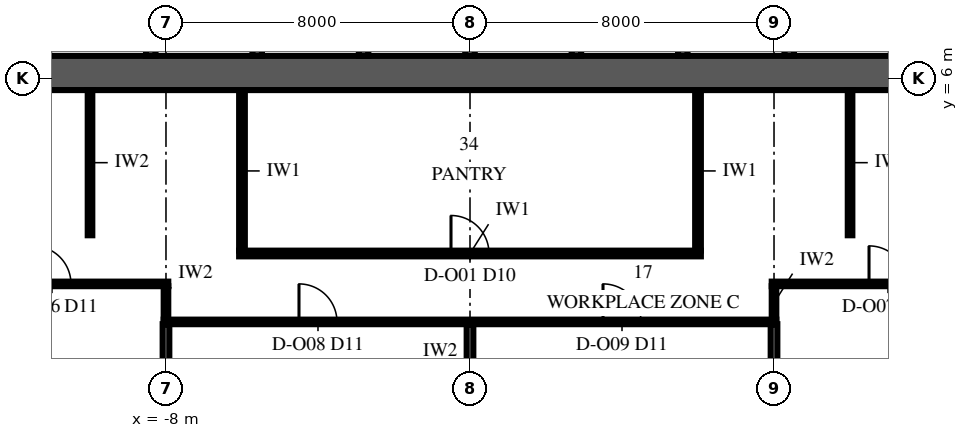
"""IFC4 building model, lengths in metres.
Left out: names, types, materials, properties, quantities, classifications, styles, units other than length and angle.
Written with IfcOpenShell. Run it as: python <this file> out.ifc"""

import sys

from ifc_helpers import new_model, si_unit, direction, frame, frame_2d, origin, place, context, subcontext, project, spatial, rectangle, extrude, element, fill, save


model = new_model("IFC4")
c1 = context("Model", 3, precision=1e-05, world=origin(), true_north=direction((0.0, 1.0)))
c2 = subcontext(c1, "Body", "Model", "MODEL_VIEW")
j1 = project(units=[si_unit("LENGTHUNIT", "METRE"), si_unit("PLANEANGLEUNIT", "RADIAN")], contexts=[c1])
p1 = place(None, origin())
s1 = spatial("IfcSite", under=j1, at=p1, CompositionType="ELEMENT")
p2 = place(p1, origin())
s2 = spatial("IfcBuilding", under=s1, at=p2, CompositionType="ELEMENT")
p3 = place(p2, frame((0.0, 0.0, 72.0)))
s3 = spatial("IfcBuildingStorey", under=s2, at=p3, CompositionType="ELEMENT", Elevation=72.0)
p4 = place(p3, frame((-13.85, 6.15, 0.0), z_axis=(0.0, 0.0, 1.0), x_axis=(1.0, 0.0, 0.0)))
e1 = element("IfcWall", 1, at=p4, inside=s3, PredefinedType="SHEAR", context=c2, shape_type="SweptSolid", body=[
    extrude(rectangle(XDim=27.7, YDim=0.9, at=frame_2d((13.85, 0.0))), origin(), (0.0, 0.0, 1.0), 4.0),
])
for number, where, z_axis, x_axis in (
    (2, (-8.4, 6.6, 0.0), (0.0, 0.0, 1.0), (0.0, 1.0, 0.0)),
    (3, (-5.6, 6.6, 0.0), (0.0, 0.0, 1.0), (0.0, 1.0, 0.0)),
    (4, (-2.8, 6.6, 0.0), (0.0, 0.0, 1.0), (0.0, 1.0, 0.0)),
    (5, (0.0, 6.6, 0.0), (0.0, 0.0, 1.0), (0.0, 1.0, 0.0)),
    (6, (2.8, 6.6, 0.0), (0.0, 0.0, 1.0), (0.0, 1.0, 0.0)),
    (7, (5.6, 6.6, 0.0), (0.0, 0.0, 1.0), (0.0, 1.0, 0.0)),
    (8, (8.4, 6.6, 0.0), (0.0, 0.0, 1.0), (0.0, 1.0, 0.0)),
):
    element("IfcWall", number, at=place(p3, frame(where, z_axis=z_axis, x_axis=x_axis)), inside=s3, PredefinedType="SHEAR", context=c2, shape_type="SweptSolid", body=[
        extrude(rectangle(XDim=2.675, YDim=0.25, at=frame_2d((1.337, 0.0))), origin(), (0.0, 0.0, 1.0), 4.0),
    ])
p5 = place(p3, frame((-8.06, -0.4, 0.0), z_axis=(0.0, 0.0, 1.0), x_axis=(1.0, 0.0, 0.0)))
e9 = element("IfcWall", 9, at=p5, inside=s3, PredefinedType="PARTITIONING", context=c2, shape_type="SweptSolid", body=[
    extrude(rectangle(XDim=16.12, YDim=0.12, at=frame_2d((8.06, 0.0))), origin(), (0.0, 0.0, 1.0), 3.25),
])
p6 = place(p5, frame((3.56, 0.0, 0.0)))
e10 = element("IfcOpeningElement", 10, at=p6, cuts=e9, PredefinedType="OPENING", context=c2, shape_type="SweptSolid", body=[
    extrude(rectangle(XDim=1.0, YDim=2.4, at=frame_2d((0.5, 1.2))), frame((0.0, 0.075, 0.0), z_axis=(0.0, -1.0, 0.0), x_axis=(1.0, 0.0, 0.0)), (0.0, 0.0, 1.0), 0.15),
])
p7 = place(p5, frame((11.56, 0.0, 0.0)))
e11 = element("IfcOpeningElement", 11, at=p7, cuts=e9, PredefinedType="OPENING", context=c2, shape_type="SweptSolid", body=[
    extrude(rectangle(XDim=1.0, YDim=2.4, at=frame_2d((0.5, 1.2))), frame((0.0, 0.075, 0.0), z_axis=(0.0, -1.0, 0.0), x_axis=(1.0, 0.0, 0.0)), (0.0, 0.0, 1.0), 0.15),
])
p8 = place(p3, frame((-22.06, 0.6, 0.0), z_axis=(0.0, 0.0, 1.0), x_axis=(1.0, 0.0, 0.0)))
e12 = element("IfcWall", 12, at=p8, inside=s3, PredefinedType="PARTITIONING", context=c2, shape_type="SweptSolid", body=[
    extrude(rectangle(XDim=14.12, YDim=0.12, at=frame_2d((7.06, 0.0))), origin(), (0.0, 0.0, 1.0), 3.25),
])
p9 = place(p8, frame((1.56, 0.0, 0.0)))
e13 = element("IfcOpeningElement", 13, at=p9, cuts=e12, PredefinedType="OPENING", context=c2, shape_type="SweptSolid", body=[
    extrude(rectangle(XDim=1.0, YDim=2.4, at=frame_2d((0.5, 1.2))), frame((0.0, 0.075, 0.0), z_axis=(0.0, -1.0, 0.0), x_axis=(1.0, 0.0, 0.0)), (0.0, 0.0, 1.0), 0.15),
])
p10 = place(p8, frame((5.56, 0.0, 0.0)))
e14 = element("IfcOpeningElement", 14, at=p10, cuts=e12, PredefinedType="OPENING", context=c2, shape_type="SweptSolid", body=[
    extrude(rectangle(XDim=1.0, YDim=2.4, at=frame_2d((0.5, 1.2))), frame((0.0, 0.075, 0.0), z_axis=(0.0, -1.0, 0.0), x_axis=(1.0, 0.0, 0.0)), (0.0, 0.0, 1.0), 0.15),
])
p11 = place(p8, frame((10.56, 0.0, 0.0)))
e15 = element("IfcOpeningElement", 15, at=p11, cuts=e12, PredefinedType="OPENING", context=c2, shape_type="SweptSolid", body=[
    extrude(rectangle(XDim=1.0, YDim=2.4, at=frame_2d((0.5, 1.2))), frame((0.0, 0.075, 0.0), z_axis=(0.0, -1.0, 0.0), x_axis=(1.0, 0.0, 0.0)), (0.0, 0.0, 1.0), 0.15),
])
p12 = place(p3, frame((7.94, 0.6, 0.0), z_axis=(0.0, 0.0, 1.0), x_axis=(1.0, 0.0, 0.0)))
e16 = element("IfcWall", 16, at=p12, inside=s3, PredefinedType="PARTITIONING", context=c2, shape_type="SweptSolid", body=[
    extrude(rectangle(XDim=14.12, YDim=0.12, at=frame_2d((7.06, 0.0))), origin(), (0.0, 0.0, 1.0), 3.25),
])
p13 = place(p12, frame((7.56, 0.0, 0.0)))
e17 = element("IfcOpeningElement", 17, at=p13, cuts=e16, PredefinedType="OPENING", context=c2, shape_type="SweptSolid", body=[
    extrude(rectangle(XDim=1.0, YDim=2.4, at=frame_2d((0.5, 1.2))), frame((0.0, 0.075, 0.0), z_axis=(0.0, -1.0, 0.0), x_axis=(1.0, 0.0, 0.0)), (0.0, 0.0, 1.0), 0.15),
])
p14 = place(p12, frame((11.56, 0.0, 0.0)))
e18 = element("IfcOpeningElement", 18, at=p14, cuts=e16, PredefinedType="OPENING", context=c2, shape_type="SweptSolid", body=[
    extrude(rectangle(XDim=1.0, YDim=2.4, at=frame_2d((0.5, 1.2))), frame((0.0, 0.075, 0.0), z_axis=(0.0, -1.0, 0.0), x_axis=(1.0, 0.0, 0.0)), (0.0, 0.0, 1.0), 0.15),
])
p15 = place(p12, frame((2.56, 0.0, 0.0)))
e19 = element("IfcOpeningElement", 19, at=p15, cuts=e16, PredefinedType="OPENING", context=c2, shape_type="SweptSolid", body=[
    extrude(rectangle(XDim=1.0, YDim=2.4, at=frame_2d((0.5, 1.2))), frame((0.0, 0.075, 0.0), z_axis=(0.0, -1.0, 0.0), x_axis=(1.0, 0.0, 0.0)), (0.0, 0.0, 1.0), 0.15),
])
p16 = place(p3, frame((-6.075, 1.4, 0.0), z_axis=(0.0, 0.0, 1.0), x_axis=(1.0, 0.0, 0.0)))
e20 = element("IfcWall", 20, at=p16, inside=s3, PredefinedType="PARTITIONING", context=c2, shape_type="SweptSolid", body=[
    extrude(rectangle(XDim=12.15, YDim=0.15, at=frame_2d((6.075, 0.0))), origin(), (0.0, 0.0, 1.0), 3.25),
])
p17 = place(p16, frame((5.575, 0.0, 0.0)))
e21 = element("IfcOpeningElement", 21, at=p17, cuts=e20, PredefinedType="OPENING", context=c2, shape_type="SweptSolid", body=[
    extrude(rectangle(XDim=1.0, YDim=2.3, at=frame_2d((0.5, 1.15))), frame((0.0, 0.09, 0.0), z_axis=(0.0, -1.0, 0.0), x_axis=(1.0, 0.0, 0.0)), (0.0, 0.0, 1.0), 0.18),
])
p18 = place(p3, frame((-8.0, -4.74, 0.0), z_axis=(0.0, 0.0, 1.0), x_axis=(0.0, 1.0, 0.0)))
e22 = element("IfcWall", 22, at=p18, inside=s3, PredefinedType="PARTITIONING", context=c2, shape_type="SweptSolid", body=[
    extrude(rectangle(XDim=4.28, YDim=0.175, at=frame_2d((2.14, 0.0))), origin(), (0.0, 0.0, 1.0), 3.85),
])
p19 = place(p3, frame((-8.0, -0.34, 0.0), z_axis=(0.0, 0.0, 1.0), x_axis=(0.0, 1.0, 0.0)))
e23 = element("IfcWall", 23, at=p19, inside=s3, PredefinedType="PARTITIONING", context=c2, shape_type="SweptSolid", body=[
    extrude(rectangle(XDim=0.88, YDim=0.12, at=frame_2d((0.44, 0.0))), origin(), (0.0, 0.0, 1.0), 3.85),
])
p20 = place(p3, frame((-6.0, 1.475, 0.0), z_axis=(0.0, 0.0, 1.0), x_axis=(0.0, 1.0, 0.0)))
e24 = element("IfcWall", 24, at=p20, inside=s3, PredefinedType="PARTITIONING", context=c2, shape_type="SweptSolid", body=[
    extrude(rectangle(XDim=4.195, YDim=0.15, at=frame_2d((2.097, 0.0))), origin(), (0.0, 0.0, 1.0), 3.85),
])
p21 = place(p3, frame((0.0, -4.74, 0.0), z_axis=(0.0, 0.0, 1.0), x_axis=(0.0, 1.0, 0.0)))
e25 = element("IfcWall", 25, at=p21, inside=s3, PredefinedType="PARTITIONING", context=c2, shape_type="SweptSolid", body=[
    extrude(rectangle(XDim=4.28, YDim=0.175, at=frame_2d((2.14, 0.0))), origin(), (0.0, 0.0, 1.0), 3.85),
])
p22 = place(p3, frame((6.0, 1.475, 0.0), z_axis=(0.0, 0.0, 1.0), x_axis=(0.0, 1.0, 0.0)))
e26 = element("IfcWall", 26, at=p22, inside=s3, PredefinedType="PARTITIONING", context=c2, shape_type="SweptSolid", body=[
    extrude(rectangle(XDim=4.195, YDim=0.15, at=frame_2d((2.097, 0.0))), origin(), (0.0, 0.0, 1.0), 3.85),
])
p23 = place(p3, frame((8.0, -4.74, 0.0), z_axis=(0.0, 0.0, 1.0), x_axis=(0.0, 1.0, 0.0)))
e27 = element("IfcWall", 27, at=p23, inside=s3, PredefinedType="PARTITIONING", context=c2, shape_type="SweptSolid", body=[
    extrude(rectangle(XDim=4.28, YDim=0.175, at=frame_2d((2.14, 0.0))), origin(), (0.0, 0.0, 1.0), 3.85),
])
p24 = place(p3, frame((8.0, -0.34, 0.0), z_axis=(0.0, 0.0, 1.0), x_axis=(0.0, 1.0, 0.0)))
e28 = element("IfcWall", 28, at=p24, inside=s3, PredefinedType="PARTITIONING", context=c2, shape_type="SweptSolid", body=[
    extrude(rectangle(XDim=0.88, YDim=0.12, at=frame_2d((0.44, 0.0))), origin(), (0.0, 0.0, 1.0), 3.85),
])
for number, where, z_axis, x_axis in (
    (29, (-9.999, 1.88, 0.0), (0.0, 0.0, 1.0), (0.0, 1.0, 0.0)),
    (30, (10.001, 1.88, 0.0), (0.0, 0.0, 1.0), (0.0, 1.0, 0.0)),
):
    element("IfcWall", number, at=place(p3, frame(where, z_axis=z_axis, x_axis=x_axis)), inside=s3, PredefinedType="PARTITIONING", context=c2, shape_type="SweptSolid", body=[
        extrude(rectangle(XDim=3.82, YDim=0.12, at=frame_2d((1.91, 0.0))), origin(), (0.0, 0.0, 1.0), 3.85),
    ])
p25 = place(p17, origin())
e31 = element("IfcDoor", 31, at=p25, inside=s3, OperationType="SINGLE_SWING_LEFT", PredefinedType="DOOR", context=c2, shape_type="SweptSolid", body=[
    extrude(rectangle(XDim=1.0, YDim=2.3, at=frame_2d((0.5, 1.15))), frame((0.0, 0.075, 0.0), z_axis=(0.0, -1.0, 0.0), x_axis=(1.0, 0.0, 0.0)), (0.0, 0.0, 1.0), 0.149),
])
fill(e21, e31)
p26 = place(p11, origin())
e32 = element("IfcDoor", 32, at=p26, inside=s3, OperationType="SINGLE_SWING_RIGHT", PredefinedType="DOOR", context=c2, shape_type="SweptSolid", body=[
    extrude(rectangle(XDim=1.0, YDim=2.4, at=frame_2d((0.5, 1.2))), frame((0.0, 0.06, 0.0), z_axis=(0.0, -1.0, 0.0), x_axis=(1.0, 0.0, 0.0)), (0.0, 0.0, 1.0), 0.12),
])
fill(e15, e32)
p27 = place(p15, origin())
e33 = element("IfcDoor", 33, at=p27, inside=s3, OperationType="SINGLE_SWING_RIGHT", PredefinedType="DOOR", context=c2, shape_type="SweptSolid", body=[
    extrude(rectangle(XDim=1.0, YDim=2.4, at=frame_2d((0.5, 1.2))), frame((0.0, 0.06, 0.0), z_axis=(0.0, -1.0, 0.0), x_axis=(1.0, 0.0, 0.0)), (0.0, 0.0, 1.0), 0.12),
])
fill(e19, e33)
p28 = place(p6, origin())
e34 = element("IfcDoor", 34, at=p28, inside=s3, OperationType="SINGLE_SWING_RIGHT", PredefinedType="DOOR", context=c2, shape_type="SweptSolid", body=[
    extrude(rectangle(XDim=1.0, YDim=2.4, at=frame_2d((0.5, 1.2))), frame((0.0, 0.06, 0.0), z_axis=(0.0, -1.0, 0.0), x_axis=(1.0, 0.0, 0.0)), (0.0, 0.0, 1.0), 0.12),
])
fill(e10, e34)
p29 = place(p7, origin())
e35 = element("IfcDoor", 35, at=p29, inside=s3, OperationType="SINGLE_SWING_RIGHT", PredefinedType="DOOR", context=c2, shape_type="SweptSolid", body=[
    extrude(rectangle(XDim=1.0, YDim=2.4, at=frame_2d((0.5, 1.2))), frame((0.0, 0.06, 0.0), z_axis=(0.0, -1.0, 0.0), x_axis=(1.0, 0.0, 0.0)), (0.0, 0.0, 1.0), 0.12),
])
fill(e11, e35)
save(model, sys.argv[1])
